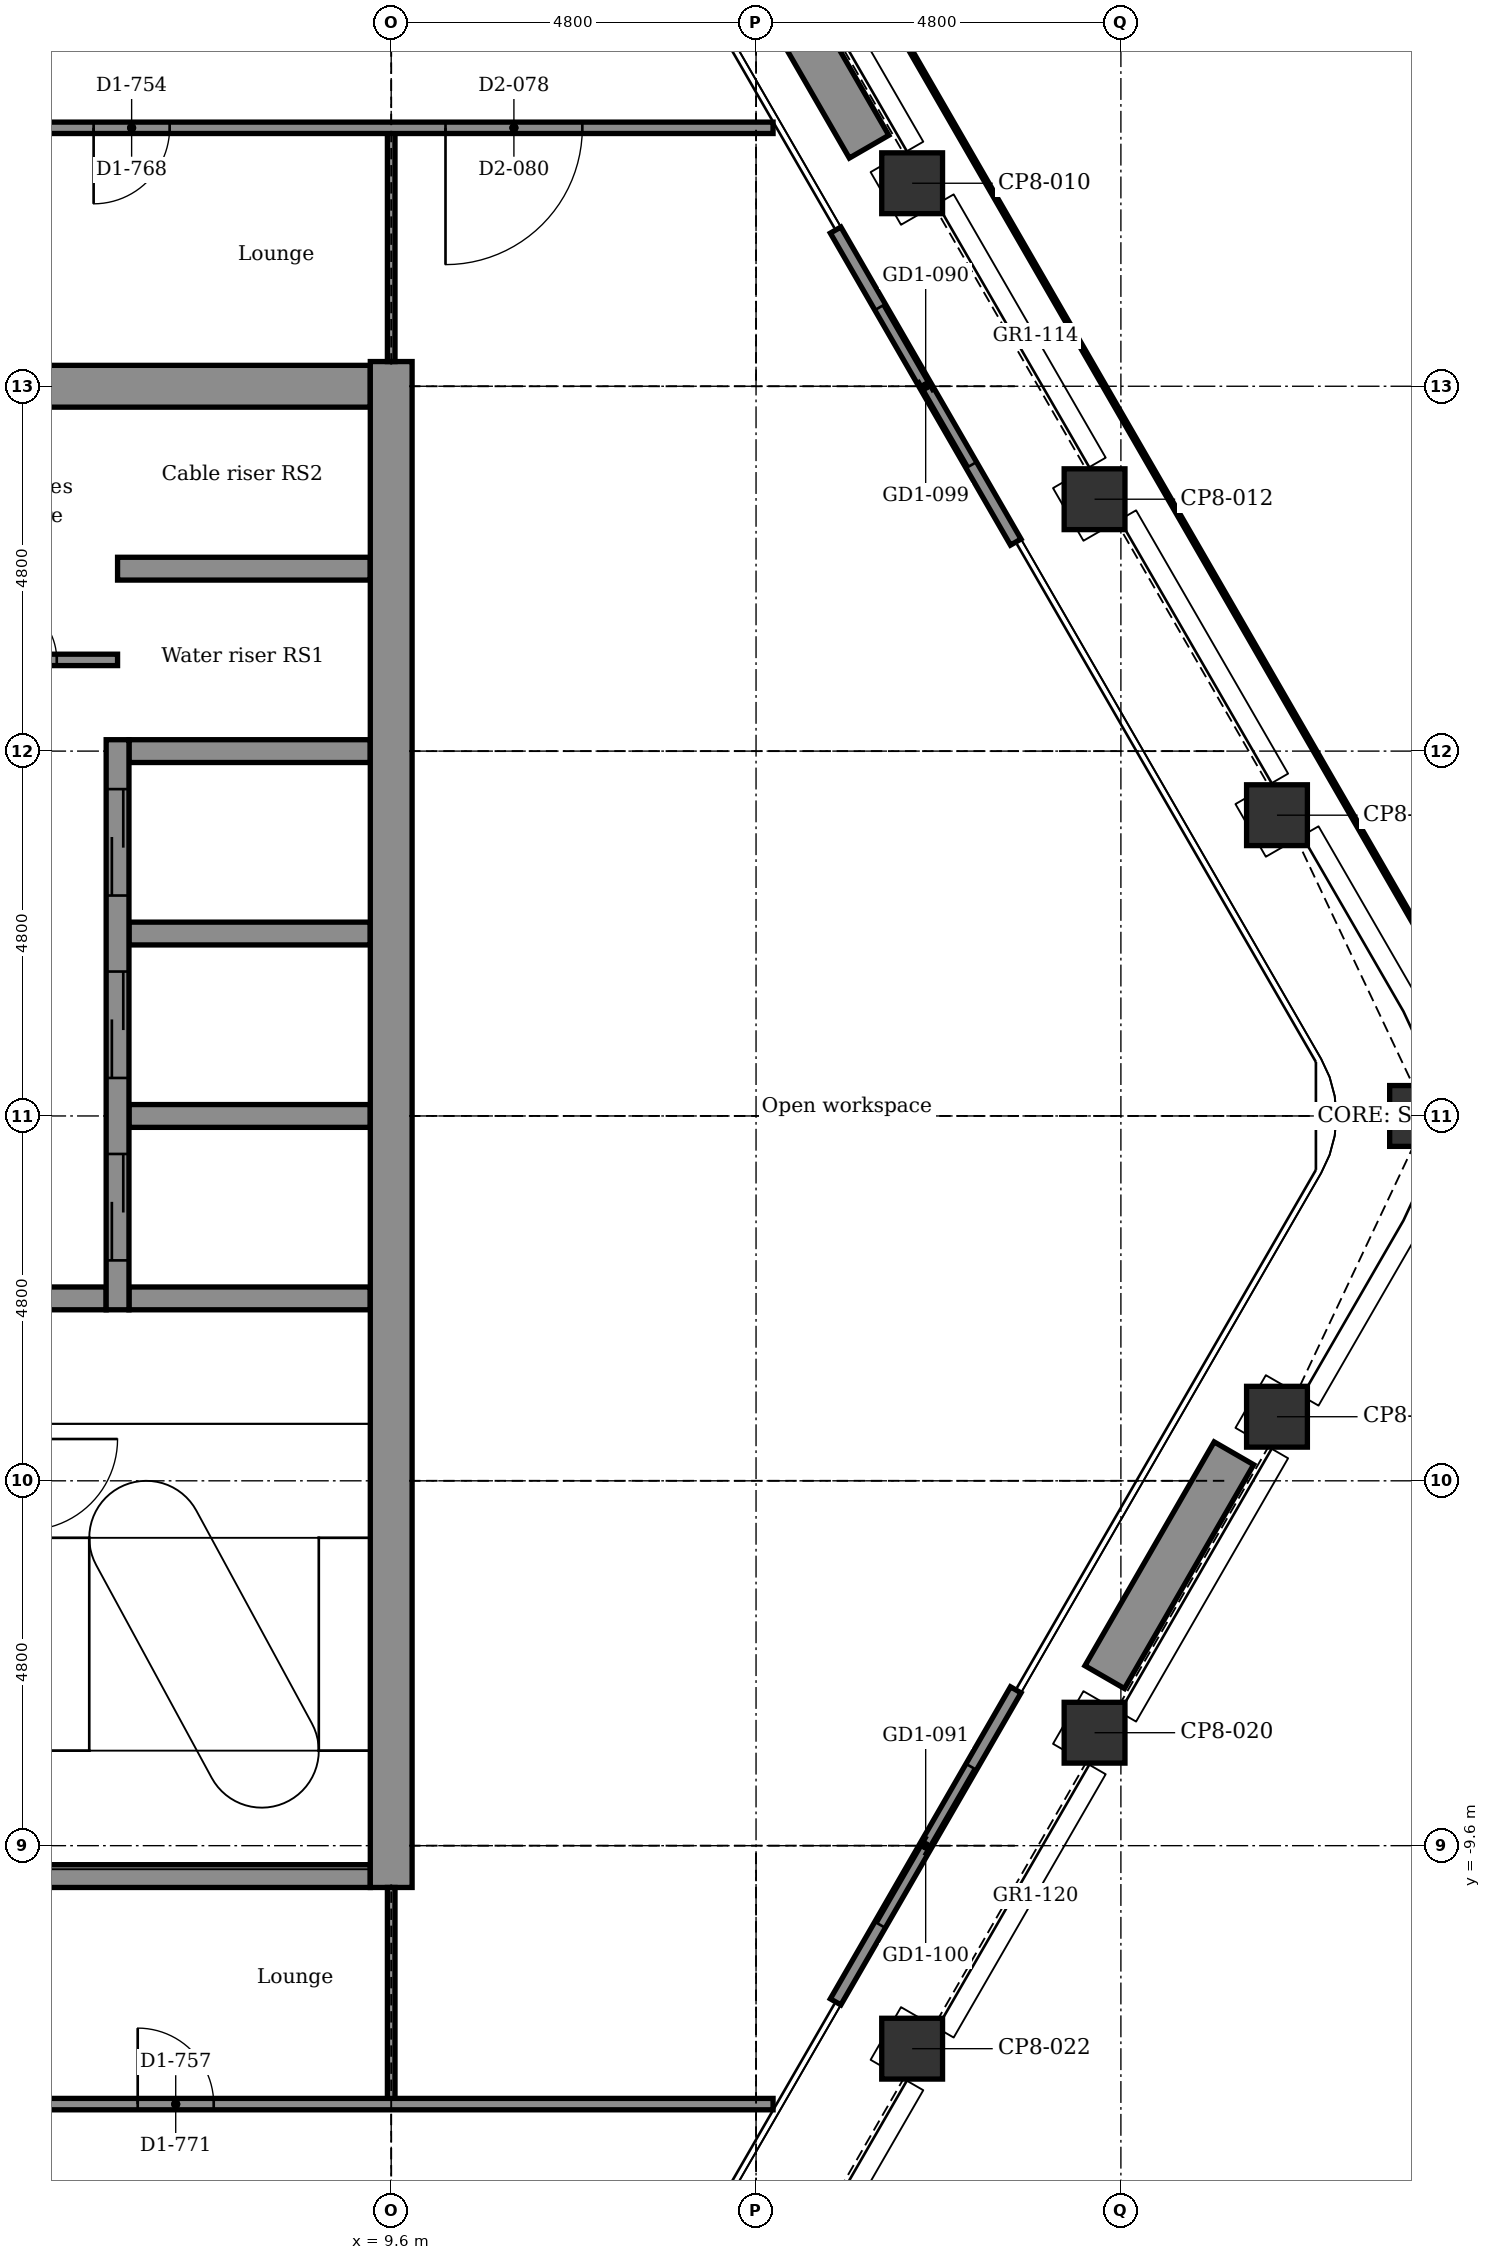
"""IFC4 building model, lengths in metres.
Left out: names, types, materials, properties, quantities, classifications, styles, units other than length and angle.
Written with IfcOpenShell. Run it as: python <this file> out.ifc"""

import sys

from ifc_helpers import new_model, si_unit, direction, frame, frame_2d, origin, origin_2d, place, context, subcontext, project, spatial, rectangle, extrude, element, fill, save


model = new_model("IFC4")
c1 = context("Model", 3, precision=1e-05, world=origin(), true_north=direction((0.0, 1.0)))
c2 = subcontext(c1, "Body", "Model", "MODEL_VIEW")
j1 = project(units=[si_unit("LENGTHUNIT", "METRE"), si_unit("PLANEANGLEUNIT", "RADIAN")], contexts=[c1])
p1 = place(None, origin())
s1 = spatial("IfcSite", under=j1, at=p1, CompositionType="ELEMENT")
p2 = place(p1, origin())
s2 = spatial("IfcBuilding", under=s1, at=p2, CompositionType="ELEMENT")
p3 = place(p2, frame((0.0, 0.0, 289.1)))
s3 = spatial("IfcBuildingStorey", under=s2, at=p3, CompositionType="ELEMENT", Elevation=289.1)
for number, where, z_axis, x_axis in (
    (1, (16.454, 12.271, -0.15), (0.0, 0.0, 1.0), (0.866, 0.5, 0.0)),
    (2, (18.854, 8.114, -0.15), (0.0, 0.0, 1.0), (0.866, 0.5, 0.0)),
    (3, (21.254, 3.957, -0.15), (0.0, 0.0, 1.0), (0.866, 0.5, 0.0)),
    (4, (23.136, 0.0, -0.15), (0.0, 0.0, 1.0), (1.0, 0.0, 0.0)),
    (5, (21.254, -3.957, -0.15), (0.0, 0.0, 1.0), (0.5, 0.866, 0.0)),
    (6, (18.854, -8.114, -0.15), (0.0, 0.0, 1.0), (0.5, 0.866, 0.0)),
    (7, (16.454, -12.271, -0.15), (0.0, 0.0, 1.0), (0.5, 0.866, 0.0)),
):
    element("IfcColumn", number, at=place(p3, frame(where, z_axis=z_axis, x_axis=x_axis)), inside=s3, PredefinedType="COLUMN", context=c2, shape_type="SweptSolid", body=[
        extrude(rectangle(XDim=0.8, YDim=0.8, at=origin_2d()), origin(), (0.0, 0.0, 1.0), 3.9),
    ])
p4 = place(p3, frame((4.95, -10.0, -0.15), z_axis=(0.0, 0.0, 1.0), x_axis=(1.0, 0.0, 0.0)))
e8 = element("IfcWall", 8, at=p4, inside=s3, PredefinedType="STANDARD", context=c2, shape_type="SweptSolid", body=[
    extrude(rectangle(XDim=4.375, YDim=0.3, at=frame_2d((2.188, 0.0))), origin(), (0.0, 0.0, 1.0), 3.9),
])
p5 = place(p3, frame((4.95, -2.4, -0.15), z_axis=(0.0, 0.0, 1.0), x_axis=(1.0, 0.0, 0.0)))
e9 = element("IfcWall", 9, at=p5, inside=s3, PredefinedType="STANDARD", context=c2, shape_type="SweptSolid", body=[
    extrude(rectangle(XDim=0.9, YDim=0.3, at=frame_2d((0.45, 0.0))), origin(), (0.0, 0.0, 1.0), 3.9),
])
for number, where, z_axis, x_axis in (
    (10, (6.15, -2.4, -0.15), (0.0, 0.0, 1.0), (1.0, 0.0, 0.0)),
    (11, (6.15, 0.0, -0.15), (0.0, 0.0, 1.0), (1.0, 0.0, 0.0)),
    (12, (6.15, 2.4, -0.15), (0.0, 0.0, 1.0), (1.0, 0.0, 0.0)),
    (13, (6.15, 4.8, -0.15), (0.0, 0.0, 1.0), (1.0, 0.0, 0.0)),
):
    element("IfcWall", number, at=place(p3, frame(where, z_axis=z_axis, x_axis=x_axis)), inside=s3, PredefinedType="STANDARD", context=c2, shape_type="SweptSolid", body=[
        extrude(rectangle(XDim=3.175, YDim=0.3, at=frame_2d((1.587, 0.0))), origin(), (0.0, 0.0, 1.0), 3.9),
    ])
p6 = place(p3, frame((6.0, 7.2, -0.15), z_axis=(0.0, 0.0, 1.0), x_axis=(1.0, 0.0, 0.0)))
e14 = element("IfcWall", 14, at=p6, inside=s3, PredefinedType="STANDARD", context=c2, shape_type="SweptSolid", body=[
    extrude(rectangle(XDim=3.325, YDim=0.3, at=frame_2d((1.663, 0.0))), origin(), (0.0, 0.0, 1.0), 3.9),
])
p7 = place(p3, frame((-5.25, 9.6, -0.15), z_axis=(0.0, 0.0, 1.0), x_axis=(1.0, 0.0, 0.0)))
e15 = element("IfcWall", 15, at=p7, inside=s3, PredefinedType="SHEAR", context=c2, shape_type="SweptSolid", body=[
    extrude(rectangle(XDim=14.575, YDim=0.55, at=frame_2d((7.288, 0.0))), origin(), (0.0, 0.0, 1.0), 3.9),
])
p8 = place(p7, frame((0.6, 0.0, 0.15)))
e16 = element("IfcOpeningElement", 16, at=p8, cuts=e15, PredefinedType="OPENING", context=c2, shape_type="SweptSolid", body=[
    extrude(rectangle(XDim=0.9, YDim=2.1, at=frame_2d((0.45, 1.05))), frame((0.0, 0.285, 0.0), z_axis=(0.0, -1.0, 0.0), x_axis=(1.0, 0.0, 0.0)), (0.0, 0.0, 1.0), 0.57),
])
p9 = place(p3, frame((6.0, -2.55, -0.15), z_axis=(0.0, 0.0, 1.0), x_axis=(0.0, 1.0, 0.0)))
e17 = element("IfcWall", 17, at=p9, inside=s3, PredefinedType="STANDARD", context=c2, shape_type="SweptSolid", body=[
    extrude(rectangle(XDim=7.5, YDim=0.3, at=frame_2d((3.75, 0.0))), origin(), (0.0, 0.0, 1.0), 3.9),
])
p10 = place(p9, frame((0.65, 0.0, 0.15)))
e18 = element("IfcOpeningElement", 18, at=p10, cuts=e17, PredefinedType="OPENING", context=c2, shape_type="SweptSolid", body=[
    extrude(rectangle(XDim=1.4, YDim=2.1, at=frame_2d((0.7, 1.05))), frame((0.0, 0.16, 0.0), z_axis=(0.0, -1.0, 0.0), x_axis=(1.0, 0.0, 0.0)), (0.0, 0.0, 1.0), 0.32),
])
p11 = place(p9, frame((3.05, 0.0, 0.15)))
e19 = element("IfcOpeningElement", 19, at=p11, cuts=e17, PredefinedType="OPENING", context=c2, shape_type="SweptSolid", body=[
    extrude(rectangle(XDim=1.4, YDim=2.1, at=frame_2d((0.7, 1.05))), frame((0.0, 0.16, 0.0), z_axis=(0.0, -1.0, 0.0), x_axis=(1.0, 0.0, 0.0)), (0.0, 0.0, 1.0), 0.32),
])
p12 = place(p9, frame((5.45, 0.0, 0.15)))
e20 = element("IfcOpeningElement", 20, at=p12, cuts=e17, PredefinedType="OPENING", context=c2, shape_type="SweptSolid", body=[
    extrude(rectangle(XDim=1.4, YDim=2.1, at=frame_2d((0.7, 1.05))), frame((0.0, 0.16, 0.0), z_axis=(0.0, -1.0, 0.0), x_axis=(1.0, 0.0, 0.0)), (0.0, 0.0, 1.0), 0.32),
])
p13 = place(p3, frame((9.6, -10.15, -0.15), z_axis=(0.0, 0.0, 1.0), x_axis=(0.0, 1.0, 0.0)))
e21 = element("IfcWall", 21, at=p13, inside=s3, PredefinedType="SHEAR", context=c2, shape_type="SweptSolid", body=[
    extrude(rectangle(XDim=20.075, YDim=0.55, at=frame_2d((10.038, 0.0))), origin(), (0.0, 0.0, 1.0), 3.9),
])
p14 = place(p3, frame((15.447, 11.655, 0.0), z_axis=(0.0, 0.0, 1.0), x_axis=(0.499978080042, -0.866038058908, 0.0)))
e22 = element("IfcWall", 22, at=p14, inside=s3, PredefinedType="PARTITIONING", context=c2, shape_type="SweptSolid", body=[
    extrude(rectangle(XDim=4.74, YDim=0.16, at=frame_2d((2.37, 0.0))), origin(), (0.0, 0.0, 1.0), 3.75),
])
p15 = place(p14, frame((1.17, 0.0, 0.0)))
e23 = element("IfcOpeningElement", 23, at=p15, cuts=e22, PredefinedType="OPENING", context=c2, shape_type="SweptSolid", body=[
    extrude(rectangle(XDim=2.4, YDim=2.4, at=frame_2d((1.2, 1.2))), frame((0.0, 0.09, 0.0), z_axis=(0.0, -1.0, 0.0), x_axis=(1.0, 0.0, 0.0)), (0.0, 0.0, 1.0), 0.18),
])
p16 = place(p3, frame((17.817, -7.55, 0.0), z_axis=(0.0, 0.0, 1.0), x_axis=(-0.499978080042, -0.866038058908, 0.0)))
e24 = element("IfcWall", 24, at=p16, inside=s3, PredefinedType="PARTITIONING", context=c2, shape_type="SweptSolid", body=[
    extrude(rectangle(XDim=4.74, YDim=0.16, at=frame_2d((2.37, 0.0))), origin(), (0.0, 0.0, 1.0), 3.75),
])
p17 = place(p16, frame((1.17, 0.0, 0.0)))
e25 = element("IfcOpeningElement", 25, at=p17, cuts=e24, PredefinedType="OPENING", context=c2, shape_type="SweptSolid", body=[
    extrude(rectangle(XDim=2.4, YDim=2.4, at=frame_2d((1.2, 1.2))), frame((0.0, 0.09, 0.0), z_axis=(0.0, -1.0, 0.0), x_axis=(1.0, 0.0, 0.0)), (0.0, 0.0, 1.0), 0.18),
])
p18 = place(p3, frame((14.187, 15.697, 0.0), z_axis=(0.0, 0.0, 1.0), x_axis=(0.499977295307, -0.866038511948, 0.0)))
e26 = element("IfcWall", 26, at=p18, inside=s3, PredefinedType="USERDEFINED", context=c2, shape_type="SweptSolid", body=[
    extrude(rectangle(XDim=3.4, YDim=0.6, at=frame_2d((1.7, 0.0))), origin(), (0.0, 0.0, 1.0), 0.7),
])
p19 = place(p3, frame((20.687, -4.438, 0.0), z_axis=(0.0, 0.0, 1.0), x_axis=(-0.500008388397, -0.866020560687, 0.0)))
e27 = element("IfcWall", 27, at=p19, inside=s3, PredefinedType="USERDEFINED", context=c2, shape_type="SweptSolid", body=[
    extrude(rectangle(XDim=3.4, YDim=0.6, at=frame_2d((1.7, 0.0))), origin(), (0.0, 0.0, 1.0), 0.7),
])
p20 = place(p3, frame((9.6, -13.0, 0.0), z_axis=(0.0, 0.0, 1.0), x_axis=(0.0, 1.0, 0.0)))
e28 = element("IfcWall", 28, at=p20, inside=s3, PredefinedType="PARTITIONING", context=c2, shape_type="SweptSolid", body=[
    extrude(rectangle(XDim=2.85, YDim=0.1, at=frame_2d((1.425, 0.0))), origin(), (0.0, 0.0, 1.0), 3.293),
])
p21 = place(p3, frame((9.6, 9.925, 0.0), z_axis=(0.0, 0.0, 1.0), x_axis=(0.0, 1.0, 0.0)))
e29 = element("IfcWall", 29, at=p21, inside=s3, PredefinedType="PARTITIONING", context=c2, shape_type="SweptSolid", body=[
    extrude(rectangle(XDim=3.075, YDim=0.1, at=frame_2d((1.538, 0.0))), origin(), (0.0, 0.0, 1.0), 3.217),
])
p22 = place(p3, frame((-2.4, -13.0, 0.0), z_axis=(0.0, 0.0, 1.0), x_axis=(1.0, 0.0, 0.0)))
e30 = element("IfcWall", 30, at=p22, inside=s3, PredefinedType="PARTITIONING", context=c2, shape_type="SweptSolid", body=[
    extrude(rectangle(XDim=17.024, YDim=0.15, at=frame_2d((8.512, 0.0))), origin(), (0.0, 0.0, 1.0), 3.75),
])
p23 = place(p22, frame((5.025, 0.0, 0.0)))
e31 = element("IfcOpeningElement", 31, at=p23, cuts=e30, PredefinedType="OPENING", context=c2, shape_type="SweptSolid", body=[
    extrude(rectangle(XDim=1.0, YDim=2.1, at=frame_2d((0.5, 1.05))), frame((0.0, 0.085, 0.0), z_axis=(0.0, -1.0, 0.0), x_axis=(1.0, 0.0, 0.0)), (0.0, 0.0, 1.0), 0.17),
])
p24 = place(p22, frame((8.665, 0.0, 0.0)))
e32 = element("IfcOpeningElement", 32, at=p24, cuts=e30, PredefinedType="OPENING", context=c2, shape_type="SweptSolid", body=[
    extrude(rectangle(XDim=1.0, YDim=2.1, at=frame_2d((0.5, 1.05))), frame((0.0, 0.085, 0.0), z_axis=(0.0, -1.0, 0.0), x_axis=(1.0, 0.0, 0.0)), (0.0, 0.0, 1.0), 0.17),
])
p25 = place(p3, frame((3.75, 6.0, 0.0), z_axis=(0.0, 0.0, 1.0), x_axis=(1.0, 0.0, 0.0)))
e33 = element("IfcWall", 33, at=p25, inside=s3, PredefinedType="PARTITIONING", context=c2, shape_type="SweptSolid", body=[
    extrude(rectangle(XDim=2.25, YDim=0.15, at=frame_2d((1.125, 0.0))), origin(), (0.0, 0.0, 1.0), 3.75),
])
p26 = place(p25, frame((0.65, 0.0, 0.0)))
e34 = element("IfcOpeningElement", 34, at=p26, cuts=e33, PredefinedType="OPENING", context=c2, shape_type="SweptSolid", body=[
    extrude(rectangle(XDim=0.8, YDim=2.1, at=frame_2d((0.4, 1.05))), frame((0.0, 0.085, 0.0), z_axis=(0.0, -1.0, 0.0), x_axis=(1.0, 0.0, 0.0)), (0.0, 0.0, 1.0), 0.17),
])
p27 = place(p3, frame((-3.0, 13.0, 0.0), z_axis=(0.0, 0.0, 1.0), x_axis=(1.0, 0.0, 0.0)))
e35 = element("IfcWall", 35, at=p27, inside=s3, PredefinedType="PARTITIONING", context=c2, shape_type="SweptSolid", body=[
    extrude(rectangle(XDim=17.624, YDim=0.15, at=frame_2d((8.812, 0.0))), origin(), (0.0, 0.0, 1.0), 3.75),
])
p28 = place(p27, frame((1.0, 0.0, 0.0)))
e36 = element("IfcOpeningElement", 36, at=p28, cuts=e35, PredefinedType="OPENING", context=c2, shape_type="SweptSolid", body=[
    extrude(rectangle(XDim=1.0, YDim=2.1, at=frame_2d((0.5, 1.05))), frame((0.0, 0.085, 0.0), z_axis=(0.0, -1.0, 0.0), x_axis=(1.0, 0.0, 0.0)), (0.0, 0.0, 1.0), 0.17),
])
p29 = place(p27, frame((4.95, 0.0, 0.0)))
e37 = element("IfcOpeningElement", 37, at=p29, cuts=e35, PredefinedType="OPENING", context=c2, shape_type="SweptSolid", body=[
    extrude(rectangle(XDim=0.9, YDim=2.1, at=frame_2d((0.45, 1.05))), frame((0.0, 0.085, 0.0), z_axis=(0.0, -1.0, 0.0), x_axis=(1.0, 0.0, 0.0)), (0.0, 0.0, 1.0), 0.17),
])
p30 = place(p27, frame((8.685, 0.0, 0.0)))
e38 = element("IfcOpeningElement", 38, at=p30, cuts=e35, PredefinedType="OPENING", context=c2, shape_type="SweptSolid", body=[
    extrude(rectangle(XDim=1.0, YDim=2.1, at=frame_2d((0.5, 1.05))), frame((0.0, 0.085, 0.0), z_axis=(0.0, -1.0, 0.0), x_axis=(1.0, 0.0, 0.0)), (0.0, 0.0, 1.0), 0.17),
])
p31 = place(p27, frame((13.314, 0.0, 0.0)))
e39 = element("IfcOpeningElement", 39, at=p31, cuts=e35, PredefinedType="OPENING", context=c2, shape_type="SweptSolid", body=[
    extrude(rectangle(XDim=1.8, YDim=2.1, at=frame_2d((0.9, 1.05))), frame((0.0, 0.085, 0.0), z_axis=(0.0, -1.0, 0.0), x_axis=(1.0, 0.0, 0.0)), (0.0, 0.0, 1.0), 0.17),
])
p32 = place(p15, origin())
e40 = element("IfcDoor", 40, at=p32, inside=s3, OperationType="DOUBLE_DOOR_SLIDING", PredefinedType="DOOR", context=c2, shape_type="SweptSolid", body=[
    extrude(rectangle(XDim=2.4, YDim=2.4, at=frame_2d((1.2, 1.2))), frame((0.0, 0.025, 0.0), z_axis=(0.0, -1.0, 0.0), x_axis=(1.0, 0.0, 0.0)), (0.0, 0.0, 1.0), 0.05),
])
fill(e23, e40)
p33 = place(p17, origin())
e41 = element("IfcDoor", 41, at=p33, inside=s3, OperationType="DOUBLE_DOOR_SLIDING", PredefinedType="DOOR", context=c2, shape_type="SweptSolid", body=[
    extrude(rectangle(XDim=2.4, YDim=2.4, at=frame_2d((1.2, 1.2))), frame((0.0, 0.025, 0.0), z_axis=(0.0, -1.0, 0.0), x_axis=(1.0, 0.0, 0.0)), (0.0, 0.0, 1.0), 0.05),
])
fill(e25, e41)
p34 = place(p26, origin())
e42 = element("IfcDoor", 42, at=p34, inside=s3, OperationType="SINGLE_SWING_LEFT", PredefinedType="DOOR", context=c2, shape_type="SweptSolid", body=[
    extrude(rectangle(XDim=0.8, YDim=2.1, at=frame_2d((0.4, 1.05))), frame((0.0, 0.025, 0.0), z_axis=(0.0, -1.0, 0.0), x_axis=(1.0, 0.0, 0.0)), (0.0, 0.0, 1.0), 0.05),
])
fill(e34, e42)
p35 = place(p30, frame((1.0, 0.0, 0.0), z_axis=(0.0, 0.0, 1.0), x_axis=(-1.0, 0.0, 0.0)))
e43 = element("IfcDoor", 43, at=p35, inside=s3, OperationType="SINGLE_SWING_LEFT", PredefinedType="DOOR", context=c2, shape_type="SweptSolid", body=[
    extrude(rectangle(XDim=1.0, YDim=2.1, at=frame_2d((0.5, 1.05))), frame((0.0, 0.025, 0.0), z_axis=(0.0, -1.0, 0.0), x_axis=(1.0, 0.0, 0.0)), (0.0, 0.0, 1.0), 0.05),
])
fill(e38, e43)
p36 = place(p24, origin())
e44 = element("IfcDoor", 44, at=p36, inside=s3, OperationType="SINGLE_SWING_LEFT", PredefinedType="DOOR", context=c2, shape_type="SweptSolid", body=[
    extrude(rectangle(XDim=1.0, YDim=2.1, at=frame_2d((0.5, 1.05))), frame((0.0, 0.025, 0.0), z_axis=(0.0, -1.0, 0.0), x_axis=(1.0, 0.0, 0.0)), (0.0, 0.0, 1.0), 0.05),
])
fill(e32, e44)
p37 = place(p31, frame((1.8, 0.0, 0.0), z_axis=(0.0, 0.0, 1.0), x_axis=(-1.0, 0.0, 0.0)))
e45 = element("IfcDoor", 45, at=p37, inside=s3, OperationType="SINGLE_SWING_LEFT", PredefinedType="DOOR", context=c2, shape_type="SweptSolid", body=[
    extrude(rectangle(XDim=1.8, YDim=2.1, at=frame_2d((0.9, 1.05))), frame((0.0, 0.025, 0.0), z_axis=(0.0, -1.0, 0.0), x_axis=(1.0, 0.0, 0.0)), (0.0, 0.0, 1.0), 0.05),
])
fill(e39, e45)
p38 = place(p10, origin())
e46 = element("IfcDoor", 46, at=p38, inside=s3, OperationType="DOUBLE_DOOR_SLIDING", PredefinedType="DOOR", context=c2, shape_type="SweptSolid", body=[
    extrude(rectangle(XDim=1.4, YDim=2.1, at=frame_2d((0.7, 1.05))), frame((0.0, 0.025, 0.0), z_axis=(0.0, -1.0, 0.0), x_axis=(1.0, 0.0, 0.0)), (0.0, 0.0, 1.0), 0.05),
])
fill(e18, e46)
p39 = place(p11, origin())
e47 = element("IfcDoor", 47, at=p39, inside=s3, OperationType="DOUBLE_DOOR_SLIDING", PredefinedType="DOOR", context=c2, shape_type="SweptSolid", body=[
    extrude(rectangle(XDim=1.4, YDim=2.1, at=frame_2d((0.7, 1.05))), frame((0.0, 0.025, 0.0), z_axis=(0.0, -1.0, 0.0), x_axis=(1.0, 0.0, 0.0)), (0.0, 0.0, 1.0), 0.05),
])
fill(e19, e47)
p40 = place(p12, origin())
e48 = element("IfcDoor", 48, at=p40, inside=s3, OperationType="DOUBLE_DOOR_SLIDING", PredefinedType="DOOR", context=c2, shape_type="SweptSolid", body=[
    extrude(rectangle(XDim=1.4, YDim=2.1, at=frame_2d((0.7, 1.05))), frame((0.0, 0.025, 0.0), z_axis=(0.0, -1.0, 0.0), x_axis=(1.0, 0.0, 0.0)), (0.0, 0.0, 1.0), 0.05),
])
fill(e20, e48)
save(model, sys.argv[1])
